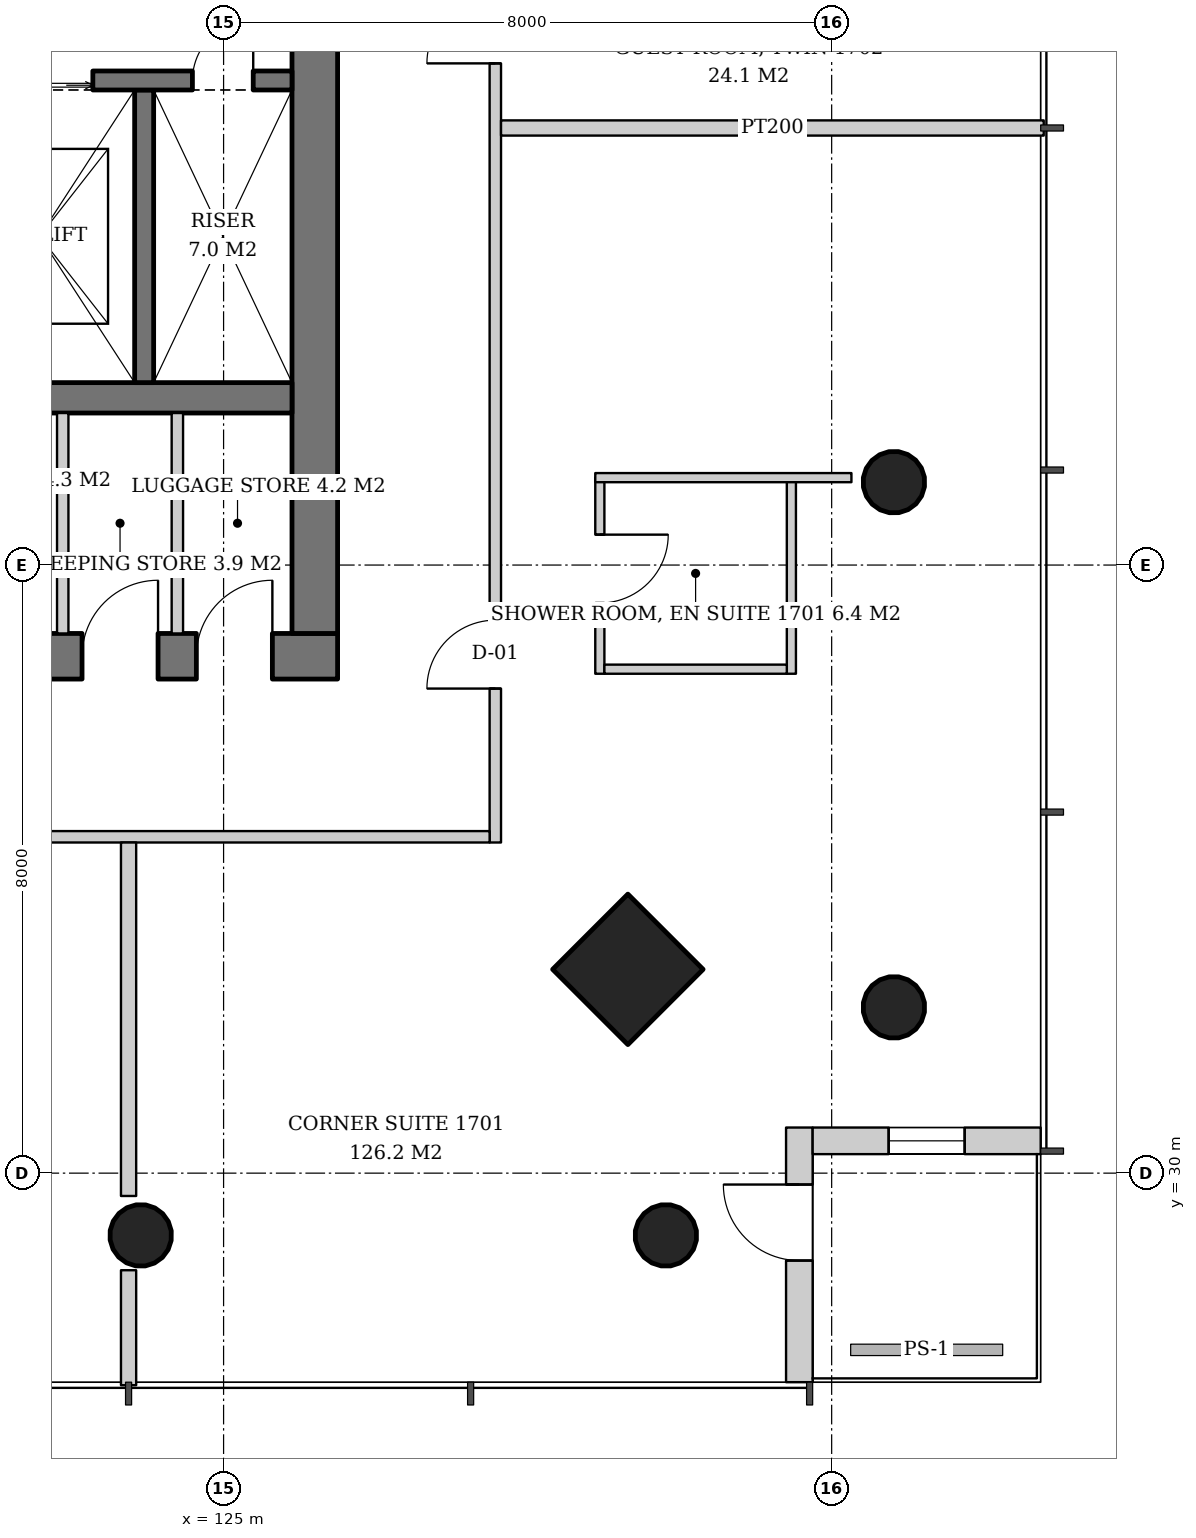
"""IFC4 building model, lengths in metres.
Left out: names, types, materials, properties, quantities, classifications, styles, units other than length and angle.
Written with IfcOpenShell. Run it as: python <this file> out.ifc"""

import sys

from ifc_helpers import new_model, si_unit, direction, frame, frame_2d, origin, origin_2d, place, context, subcontext, project, spatial, rectangle, hollow_circle, extrude, element, fill, save


model = new_model("IFC4")
c1 = context("Model", 3, precision=1e-05, world=origin(), true_north=direction((0.0, 1.0)))
c2 = subcontext(c1, "Body", "Model", "MODEL_VIEW")
j1 = project(units=[si_unit("LENGTHUNIT", "METRE"), si_unit("PLANEANGLEUNIT", "RADIAN")], contexts=[c1])
p1 = place(None, origin())
s1 = spatial("IfcSite", under=j1, at=p1, CompositionType="ELEMENT")
p2 = place(p1, origin())
s2 = spatial("IfcBuilding", under=s1, at=p2, CompositionType="ELEMENT")
p3 = place(p2, frame((0.0, 0.0, 70.4)))
s3 = spatial("IfcBuildingStorey", under=s2, at=p3, CompositionType="ELEMENT", Elevation=70.4)
p4 = place(p3, frame((133.871, 32.129, 0.0), z_axis=(-0.043029647111, 0.043029647111, 0.998146732169), x_axis=(-0.707106781187, -0.707106781187, 0.0)))
e1 = element("IfcColumn", 1, at=p4, inside=s3, PredefinedType="COLUMN", context=c2, shape_type="SweptSolid", body=[
    extrude(hollow_circle(Radius=0.406, WallThickness=0.03, at=origin_2d()), origin(), (0.0, 0.0, 1.0), 3.807),
])
p5 = place(p3, frame((133.871, 39.065, 0.0), z_axis=(-0.043059584825, 0.021497706284, 0.998841188968), x_axis=(-0.446680166538, -0.894693706707, 0.0)))
e2 = element("IfcColumn", 2, at=p5, inside=s3, PredefinedType="COLUMN", context=c2, shape_type="SweptSolid", body=[
    extrude(hollow_circle(Radius=0.406, WallThickness=0.03, at=origin_2d()), origin(), (0.0, 0.0, 1.0), 3.804),
])
p6 = place(p3, frame((130.371, 32.629, 0.0), z_axis=(-0.043029647111, 0.043029647111, 0.998146732169), x_axis=(-0.707106781187, -0.707106781187, 0.0)))
e3 = element("IfcColumn", 3, at=p6, inside=s3, PredefinedType="COLUMN", context=c2, shape_type="SweptSolid", body=[
    extrude(rectangle(XDim=1.4, YDim=1.4, at=origin_2d()), origin(), (0.0, 0.0, 1.0), 3.807),
])
p7 = place(p3, frame((130.871, 29.129, 0.0), z_axis=(-0.043029647111, 0.043029647111, 0.998146732169), x_axis=(-0.707106781187, -0.707106781187, 0.0)))
e4 = element("IfcColumn", 4, at=p7, inside=s3, PredefinedType="COLUMN", context=c2, shape_type="SweptSolid", body=[
    extrude(hollow_circle(Radius=0.406, WallThickness=0.03, at=origin_2d()), origin(), (0.0, 0.0, 1.0), 3.807),
])
p8 = place(p3, frame((123.935, 29.129, 0.0), z_axis=(-0.021497706284, 0.043059584825, 0.998841188968), x_axis=(-0.894693706707, -0.446680166538, 0.0)))
e5 = element("IfcColumn", 5, at=p8, inside=s3, PredefinedType="COLUMN", context=c2, shape_type="SweptSolid", body=[
    extrude(hollow_circle(Radius=0.406, WallThickness=0.03, at=origin_2d()), origin(), (0.0, 0.0, 1.0), 3.804),
])
p9 = place(p3, frame((107.5, 36.8, 0.0), z_axis=(0.0, 0.0, 1.0), x_axis=(1.0, 0.0, 0.0)))
e6 = element("IfcWall", 6, at=p9, inside=s3, PredefinedType="SHEAR", context=c2, shape_type="SweptSolid", body=[
    extrude(rectangle(XDim=19.0, YDim=0.6, at=frame_2d((9.5, 0.0))), origin(), (0.0, 0.0, 1.0), 3.8),
])
p10 = place(p9, frame((3.9, 0.0, 0.0)))
e7 = element("IfcOpeningElement", 7, at=p10, cuts=e6, PredefinedType="OPENING", context=c2, shape_type="SweptSolid", body=[
    extrude(rectangle(XDim=1.0, YDim=2.1, at=frame_2d((0.5, 1.05))), frame((0.0, 0.31, 0.0), z_axis=(0.0, -1.0, 0.0), x_axis=(1.0, 0.0, 0.0)), (0.0, 0.0, 1.0), 0.62),
])
p11 = place(p9, frame((14.107, 0.0, 0.0)))
e8 = element("IfcOpeningElement", 8, at=p11, cuts=e6, PredefinedType="OPENING", context=c2, shape_type="SweptSolid", body=[
    extrude(rectangle(XDim=1.0, YDim=2.1, at=frame_2d((0.5, 1.05))), frame((0.0, 0.31, 0.0), z_axis=(0.0, -1.0, 0.0), x_axis=(1.0, 0.0, 0.0)), (0.0, 0.0, 1.0), 0.62),
])
p12 = place(p9, frame((15.638, 0.0, 0.0)))
e9 = element("IfcOpeningElement", 9, at=p12, cuts=e6, PredefinedType="OPENING", context=c2, shape_type="SweptSolid", body=[
    extrude(rectangle(XDim=1.0, YDim=2.1, at=frame_2d((0.5, 1.05))), frame((0.0, 0.31, 0.0), z_axis=(0.0, -1.0, 0.0), x_axis=(1.0, 0.0, 0.0)), (0.0, 0.0, 1.0), 0.62),
])
p13 = place(p9, frame((17.142, 0.0, 0.0)))
e10 = element("IfcOpeningElement", 10, at=p13, cuts=e6, PredefinedType="OPENING", context=c2, shape_type="SweptSolid", body=[
    extrude(rectangle(XDim=1.0, YDim=2.1, at=frame_2d((0.5, 1.05))), frame((0.0, 0.31, 0.0), z_axis=(0.0, -1.0, 0.0), x_axis=(1.0, 0.0, 0.0)), (0.0, 0.0, 1.0), 0.62),
])
p14 = place(p3, frame((126.2, 37.1, 0.0), z_axis=(0.0, 0.0, 1.0), x_axis=(0.0, 1.0, 0.0)))
e11 = element("IfcWall", 11, at=p14, inside=s3, PredefinedType="SHEAR", context=c2, shape_type="SweptSolid", body=[
    extrude(rectangle(XDim=17.8, YDim=0.6, at=frame_2d((8.9, 0.0))), origin(), (0.0, 0.0, 1.0), 3.8),
])
p15 = place(p14, frame((8.0, 0.0, 0.0)))
e12 = element("IfcOpeningElement", 12, at=p15, cuts=e11, PredefinedType="OPENING", context=c2, shape_type="SweptSolid", body=[
    extrude(rectangle(XDim=1.8, YDim=2.4, at=frame_2d((0.9, 1.2))), frame((0.0, 0.31, 0.0), z_axis=(0.0, -1.0, 0.0), x_axis=(1.0, 0.0, 0.0)), (0.0, 0.0, 1.0), 0.62),
])
p16 = place(p3, frame((108.1, 40.2, 0.0), z_axis=(0.0, 0.0, 1.0), x_axis=(1.0, 0.0, 0.0)))
e13 = element("IfcWall", 13, at=p16, inside=s3, PredefinedType="SHEAR", context=c2, shape_type="SweptSolid", body=[
    extrude(rectangle(XDim=17.8, YDim=0.4, at=frame_2d((8.9, 0.0))), origin(), (0.0, 0.0, 1.0), 3.8),
])
p17 = place(p3, frame((132.575, 27.25, 0.0), z_axis=(0.0, 0.0, 1.0), x_axis=(0.0, 1.0, 0.0)))
e14 = element("IfcWall", 14, at=p17, inside=s3, PredefinedType="SOLIDWALL", context=c2, shape_type="SweptSolid", body=[
    extrude(rectangle(XDim=3.35, YDim=0.35, at=frame_2d((1.675, 0.0))), origin(), (0.0, 0.0, 1.0), 3.6),
])
p18 = place(p17, frame((1.6, 0.0, 0.0)))
e15 = element("IfcOpeningElement", 15, at=p18, cuts=e14, PredefinedType="OPENING", context=c2, shape_type="SweptSolid", body=[
    extrude(rectangle(XDim=1.0, YDim=2.4, at=frame_2d((0.5, 1.2))), frame((0.0, 0.185, 0.0), z_axis=(0.0, -1.0, 0.0), x_axis=(1.0, 0.0, 0.0)), (0.0, 0.0, 1.0), 0.37),
])
p19 = place(p3, frame((132.75, 30.425, 0.0), z_axis=(0.0, 0.0, 1.0), x_axis=(1.0, 0.0, 0.0)))
e16 = element("IfcWall", 16, at=p19, inside=s3, PredefinedType="SOLIDWALL", context=c2, shape_type="SweptSolid", body=[
    extrude(rectangle(XDim=3.0, YDim=0.35, at=frame_2d((1.5, 0.0))), origin(), (0.0, 0.0, 1.0), 3.6),
])
p20 = place(p19, frame((1.0, 0.0, 0.9)))
e17 = element("IfcOpeningElement", 17, at=p20, cuts=e16, PredefinedType="OPENING", context=c2, shape_type="SweptSolid", body=[
    extrude(rectangle(XDim=1.0, YDim=2.4, at=frame_2d((0.5, 1.2))), frame((0.0, 0.185, 0.0), z_axis=(0.0, -1.0, 0.0), x_axis=(1.0, 0.0, 0.0)), (0.0, 0.0, 1.0), 0.37),
])
p21 = place(p3, frame((123.955, 44.25, 0.0), z_axis=(0.0, 0.0, 1.0), x_axis=(0.0, -1.0, 0.0)))
e18 = element("IfcWall", 18, at=p21, inside=s3, PredefinedType="SHEAR", context=c2, shape_type="SweptSolid", body=[
    extrude(rectangle(XDim=3.85, YDim=0.25, at=frame_2d((1.925, 0.0))), origin(), (0.0, 0.0, 1.0), 3.8),
])
p22 = place(p3, frame((121.33, 44.375, 0.0), z_axis=(0.0, 0.0, 1.0), x_axis=(1.0, 0.0, 0.0)))
e19 = element("IfcWall", 19, at=p22, inside=s3, PredefinedType="SHEAR", context=c2, shape_type="SweptSolid", body=[
    extrude(rectangle(XDim=4.57, YDim=0.25, at=frame_2d((2.285, 0.0))), origin(), (0.0, 0.0, 1.0), 3.8),
])
p23 = place(p22, frame((0.55, 0.0, 0.0)))
e20 = element("IfcOpeningElement", 20, at=p23, cuts=e19, PredefinedType="OPENING", context=c2, shape_type="SweptSolid", body=[
    extrude(rectangle(XDim=1.4, YDim=2.4, at=frame_2d((0.7, 1.2))), frame((0.0, 0.135, 0.0), z_axis=(0.0, -1.0, 0.0), x_axis=(1.0, 0.0, 0.0)), (0.0, 0.0, 1.0), 0.27),
])
p24 = place(p22, frame((3.26, 0.0, 0.0)))
e21 = element("IfcOpeningElement", 21, at=p24, cuts=e19, PredefinedType="OPENING", context=c2, shape_type="SweptSolid", body=[
    extrude(rectangle(XDim=0.8, YDim=2.0, at=frame_2d((0.4, 1.0))), frame((0.0, 0.135, 0.0), z_axis=(0.0, -1.0, 0.0), x_axis=(1.0, 0.0, 0.0)), (0.0, 0.0, 1.0), 0.27),
])
for number, where, z_axis, x_axis in (
    (22, (122.884, 37.1, 0.0), (0.0, 0.0, 1.0), (0.0, 1.0, 0.0)),
    (23, (124.392, 37.1, 0.0), (0.0, 0.0, 1.0), (0.0, 1.0, 0.0)),
):
    element("IfcWall", number, at=place(p3, frame(where, z_axis=z_axis, x_axis=x_axis)), inside=s3, PredefinedType="SOLIDWALL", context=c2, shape_type="SweptSolid", body=[
        extrude(rectangle(XDim=2.9, YDim=0.15, at=frame_2d((1.45, 0.0))), origin(), (0.0, 0.0, 1.0), 3.6),
    ])
p25 = place(p3, frame((129.95, 39.15, 0.0), z_axis=(0.0, 0.0, 1.0), x_axis=(0.0, -1.0, 0.0)))
e24 = element("IfcWall", 24, at=p25, inside=s3, PredefinedType="PARTITIONING", context=c2, shape_type="SweptSolid", body=[
    extrude(rectangle(XDim=2.58, YDim=0.12, at=frame_2d((1.29, 0.0))), origin(), (0.0, 0.0, 1.0), 2.8),
])
p26 = place(p25, frame((0.75, 0.0, 0.0)))
e25 = element("IfcOpeningElement", 25, at=p26, cuts=e24, PredefinedType="OPENING", context=c2, shape_type="SweptSolid", body=[
    extrude(rectangle(XDim=0.9, YDim=2.1, at=frame_2d((0.45, 1.05))), frame((0.0, 0.07, 0.0), z_axis=(0.0, -1.0, 0.0), x_axis=(1.0, 0.0, 0.0)), (0.0, 0.0, 1.0), 0.14),
])
p27 = place(p3, frame((132.47, 39.15, 0.0), z_axis=(0.0, 0.0, 1.0), x_axis=(0.0, -1.0, 0.0)))
e26 = element("IfcWall", 26, at=p27, inside=s3, PredefinedType="PARTITIONING", context=c2, shape_type="SweptSolid", body=[
    extrude(rectangle(XDim=2.58, YDim=0.12, at=frame_2d((1.29, 0.0))), origin(), (0.0, 0.0, 1.0), 2.8),
])
p28 = place(p3, frame((130.01, 36.63, 0.0), z_axis=(0.0, 0.0, 1.0), x_axis=(1.0, 0.0, 0.0)))
e27 = element("IfcWall", 27, at=p28, inside=s3, PredefinedType="PARTITIONING", context=c2, shape_type="SweptSolid", body=[
    extrude(rectangle(XDim=2.4, YDim=0.12, at=frame_2d((1.2, 0.0))), origin(), (0.0, 0.0, 1.0), 2.8),
])
p29 = place(p3, frame((129.89, 39.15, 0.0), z_axis=(0.0, 0.0, 1.0), x_axis=(1.0, 0.0, 0.0)))
e28 = element("IfcWall", 28, at=p29, inside=s3, PredefinedType="PARTITIONING", context=c2, shape_type="SweptSolid", body=[
    extrude(rectangle(XDim=3.37, YDim=0.12, at=frame_2d((1.685, 0.0))), origin(), (0.0, 0.0, 1.0), 3.6),
])
p30 = place(p3, frame((128.575, 34.35, 0.0), z_axis=(0.0, 0.0, 1.0), x_axis=(0.0, 1.0, 0.0)))
e29 = element("IfcWall", 29, at=p30, inside=s3, PredefinedType="PARTITIONING", context=c2, shape_type="SweptSolid", body=[
    extrude(rectangle(XDim=23.15, YDim=0.15, at=frame_2d((11.575, 0.0))), origin(), (0.0, 0.0, 1.0), 2.8),
])
p31 = place(p30, frame((2.025, 0.0, 0.0)))
e30 = element("IfcOpeningElement", 30, at=p31, cuts=e29, PredefinedType="OPENING", context=c2, shape_type="SweptSolid", body=[
    extrude(rectangle(XDim=0.9, YDim=2.1, at=frame_2d((0.45, 1.05))), frame((0.0, 0.085, 0.0), z_axis=(0.0, -1.0, 0.0), x_axis=(1.0, 0.0, 0.0)), (0.0, 0.0, 1.0), 0.17),
])
p32 = place(p30, frame((10.25, 0.0, 0.0)))
e31 = element("IfcOpeningElement", 31, at=p32, cuts=e29, PredefinedType="OPENING", context=c2, shape_type="SweptSolid", body=[
    extrude(rectangle(XDim=0.9, YDim=2.1, at=frame_2d((0.45, 1.05))), frame((0.0, 0.085, 0.0), z_axis=(0.0, -1.0, 0.0), x_axis=(1.0, 0.0, 0.0)), (0.0, 0.0, 1.0), 0.17),
])
p33 = place(p30, frame((16.65, 0.0, 0.0)))
e32 = element("IfcOpeningElement", 32, at=p33, cuts=e29, PredefinedType="OPENING", context=c2, shape_type="SweptSolid", body=[
    extrude(rectangle(XDim=0.9, YDim=2.1, at=frame_2d((0.45, 1.05))), frame((0.0, 0.085, 0.0), z_axis=(0.0, -1.0, 0.0), x_axis=(1.0, 0.0, 0.0)), (0.0, 0.0, 1.0), 0.17),
])
p34 = place(p3, frame((128.65, 43.75, 0.0), z_axis=(0.0, 0.0, 1.0), x_axis=(1.0, 0.0, 0.0)))
e33 = element("IfcWall", 33, at=p34, inside=s3, PredefinedType="PARTITIONING", context=c2, shape_type="SweptSolid", body=[
    extrude(rectangle(XDim=7.14, YDim=0.2, at=frame_2d((3.57, 0.0))), origin(), (0.0, 0.0, 1.0), 3.05),
])
p35 = place(p3, frame((105.35, 34.425, 0.0), z_axis=(0.0, 0.0, 1.0), x_axis=(1.0, 0.0, 0.0)))
e34 = element("IfcWall", 34, at=p35, inside=s3, PredefinedType="PARTITIONING", context=c2, shape_type="SweptSolid", body=[
    extrude(rectangle(XDim=23.15, YDim=0.15, at=frame_2d((11.575, 0.0))), origin(), (0.0, 0.0, 1.0), 2.8),
])
p36 = place(p35, frame((2.025, 0.0, 0.0)))
e35 = element("IfcOpeningElement", 35, at=p36, cuts=e34, PredefinedType="OPENING", context=c2, shape_type="SweptSolid", body=[
    extrude(rectangle(XDim=0.9, YDim=2.1, at=frame_2d((0.45, 1.05))), frame((0.0, 0.085, 0.0), z_axis=(0.0, -1.0, 0.0), x_axis=(1.0, 0.0, 0.0)), (0.0, 0.0, 1.0), 0.17),
])
p37 = place(p35, frame((5.75, 0.0, 0.0)))
e36 = element("IfcOpeningElement", 36, at=p37, cuts=e34, PredefinedType="OPENING", context=c2, shape_type="SweptSolid", body=[
    extrude(rectangle(XDim=0.9, YDim=2.1, at=frame_2d((0.45, 1.05))), frame((0.0, 0.085, 0.0), z_axis=(0.0, -1.0, 0.0), x_axis=(1.0, 0.0, 0.0)), (0.0, 0.0, 1.0), 0.17),
])
p38 = place(p35, frame((12.15, 0.0, 0.0)))
e37 = element("IfcOpeningElement", 37, at=p38, cuts=e34, PredefinedType="OPENING", context=c2, shape_type="SweptSolid", body=[
    extrude(rectangle(XDim=0.9, YDim=2.1, at=frame_2d((0.45, 1.05))), frame((0.0, 0.085, 0.0), z_axis=(0.0, -1.0, 0.0), x_axis=(1.0, 0.0, 0.0)), (0.0, 0.0, 1.0), 0.17),
])
p39 = place(p3, frame((123.75, 34.35, 0.0), z_axis=(0.0, 0.0, 1.0), x_axis=(0.0, -1.0, 0.0)))
e38 = element("IfcWall", 38, at=p39, inside=s3, PredefinedType="PARTITIONING", context=c2, shape_type="SweptSolid", body=[
    extrude(rectangle(XDim=4.65, YDim=0.2, at=frame_2d((2.325, 0.0))), origin(), (0.0, 0.0, 1.0), 3.6),
])
p40 = place(p3, frame((123.75, 28.723, 0.0), z_axis=(0.0, 0.0, 1.0), x_axis=(0.0, -1.0, 0.0)))
e39 = element("IfcWall", 39, at=p40, inside=s3, PredefinedType="PARTITIONING", context=c2, shape_type="SweptSolid", body=[
    extrude(rectangle(XDim=1.513, YDim=0.2, at=frame_2d((0.756, 0.0))), origin(), (0.0, 0.0, 1.0), 3.6),
])
p41 = place(p18, origin())
e40 = element("IfcDoor", 40, at=p41, inside=s3, OperationType="SINGLE_SWING_RIGHT", PredefinedType="DOOR", context=c2, shape_type="SweptSolid", body=[
    extrude(rectangle(XDim=1.0, YDim=2.4, at=frame_2d((0.5, 1.2))), frame((0.0, 0.025, 0.0), z_axis=(0.0, -1.0, 0.0), x_axis=(1.0, 0.0, 0.0)), (0.0, 0.0, 1.0), 0.05),
])
fill(e15, e40)
p42 = place(p20, origin())
e41 = element("IfcWindow", 41, at=p42, inside=s3, PartitioningType="SINGLE_PANEL", PredefinedType="WINDOW", context=c2, shape_type="SweptSolid", body=[
    extrude(rectangle(XDim=1.0, YDim=2.4, at=frame_2d((0.5, 1.2))), frame((0.0, 0.03, 0.0), z_axis=(0.0, -1.0, 0.0), x_axis=(1.0, 0.0, 0.0)), (0.0, 0.0, 1.0), 0.06),
])
fill(e17, e41)
p43 = place(p23, origin())
e42 = element("IfcDoor", 42, at=p43, inside=s3, OperationType="DOUBLE_DOOR_SLIDING", PredefinedType="DOOR", context=c2, shape_type="SweptSolid", body=[
    extrude(rectangle(XDim=1.4, YDim=2.4, at=frame_2d((0.7, 1.2))), frame((0.0, 0.025, 0.0), z_axis=(0.0, -1.0, 0.0), x_axis=(1.0, 0.0, 0.0)), (0.0, 0.0, 1.0), 0.05),
])
fill(e20, e42)
p44 = place(p24, origin())
e43 = element("IfcDoor", 43, at=p44, inside=s3, OperationType="SINGLE_SWING_RIGHT", PredefinedType="DOOR", context=c2, shape_type="SweptSolid", body=[
    extrude(rectangle(XDim=0.8, YDim=2.0, at=frame_2d((0.4, 1.0))), frame((0.0, 0.025, 0.0), z_axis=(0.0, -1.0, 0.0), x_axis=(1.0, 0.0, 0.0)), (0.0, 0.0, 1.0), 0.05),
])
fill(e21, e43)
p45 = place(p12, origin())
e44 = element("IfcDoor", 44, at=p45, inside=s3, OperationType="SINGLE_SWING_RIGHT", PredefinedType="DOOR", context=c2, shape_type="SweptSolid", body=[
    extrude(rectangle(XDim=1.0, YDim=2.1, at=frame_2d((0.5, 1.05))), frame((0.0, 0.29, 0.0), z_axis=(0.0, -1.0, 0.0), x_axis=(1.0, 0.0, 0.0)), (0.0, 0.0, 1.0), 0.05),
])
fill(e9, e44)
p46 = place(p13, origin())
e45 = element("IfcDoor", 45, at=p46, inside=s3, OperationType="SINGLE_SWING_RIGHT", PredefinedType="DOOR", context=c2, shape_type="SweptSolid", body=[
    extrude(rectangle(XDim=1.0, YDim=2.1, at=frame_2d((0.5, 1.05))), frame((0.0, 0.29, 0.0), z_axis=(0.0, -1.0, 0.0), x_axis=(1.0, 0.0, 0.0)), (0.0, 0.0, 1.0), 0.05),
])
fill(e10, e45)
p47 = place(p26, origin())
e46 = element("IfcDoor", 46, at=p47, inside=s3, OperationType="SINGLE_SWING_LEFT", PredefinedType="DOOR", context=c2, shape_type="SweptSolid", body=[
    extrude(rectangle(XDim=0.9, YDim=2.1, at=frame_2d((0.45, 1.05))), frame((0.0, 0.025, 0.0), z_axis=(0.0, -1.0, 0.0), x_axis=(1.0, 0.0, 0.0)), (0.0, 0.0, 1.0), 0.05),
])
fill(e25, e46)
p48 = place(p31, origin())
e47 = element("IfcDoor", 47, at=p48, inside=s3, OperationType="SINGLE_SWING_LEFT", PredefinedType="DOOR", context=c2, shape_type="SweptSolid", body=[
    extrude(rectangle(XDim=0.9, YDim=2.1, at=frame_2d((0.45, 1.05))), frame((0.0, 0.025, 0.0), z_axis=(0.0, -1.0, 0.0), x_axis=(1.0, 0.0, 0.0)), (0.0, 0.0, 1.0), 0.05),
])
fill(e30, e47)
p49 = place(p32, origin())
e48 = element("IfcDoor", 48, at=p49, inside=s3, OperationType="SINGLE_SWING_LEFT", PredefinedType="DOOR", context=c2, shape_type="SweptSolid", body=[
    extrude(rectangle(XDim=0.9, YDim=2.1, at=frame_2d((0.45, 1.05))), frame((0.0, 0.025, 0.0), z_axis=(0.0, -1.0, 0.0), x_axis=(1.0, 0.0, 0.0)), (0.0, 0.0, 1.0), 0.05),
])
fill(e31, e48)
save(model, sys.argv[1])
